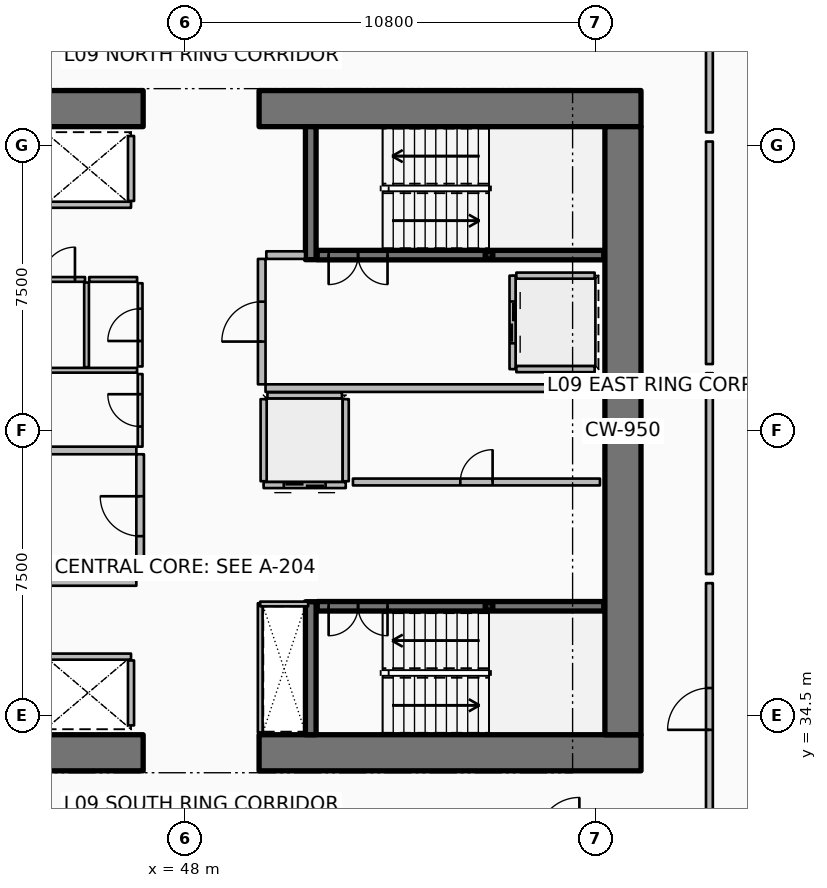
"""IFC4 building model, lengths in metres.
Left out: names, types, materials, properties, quantities, classifications, styles, units other than length and angle.
Written with IfcOpenShell. Run it as: python <this file> out.ifc"""

import sys

from ifc_helpers import new_model, si_unit, direction, frame, frame_2d, origin, origin_2d, place, context, subcontext, project, spatial, rectangle, hollow_rectangle, extrude, element, fill, save


model = new_model("IFC4")
c1 = context("Model", 3, precision=1e-05, world=origin(), true_north=direction((0.0, 1.0)))
c2 = subcontext(c1, "Body", "Model", "MODEL_VIEW")
j1 = project(units=[si_unit("LENGTHUNIT", "METRE"), si_unit("PLANEANGLEUNIT", "RADIAN")], contexts=[c1])
p1 = place(None, origin())
s1 = spatial("IfcSite", under=j1, at=p1, CompositionType="ELEMENT")
p2 = place(p1, origin())
s2 = spatial("IfcBuilding", under=s1, at=p2, CompositionType="ELEMENT")
p3 = place(p2, frame((0.0, 0.0, 41.4)))
s3 = spatial("IfcBuildingStorey", under=s2, at=p3, CompositionType="ELEMENT", Elevation=41.4)
p4 = place(p3, frame((36.85, 33.525, 0.0), z_axis=(0.0, 0.0, 1.0), x_axis=(1.0, 0.0, 0.0)))
e1 = element("IfcWall", 1, at=p4, inside=s3, PredefinedType="SHEAR", context=c2, shape_type="SweptSolid", body=[
    extrude(rectangle(XDim=10.05, YDim=0.95, at=frame_2d((5.025, 0.0))), origin(), (0.0, 0.0, 1.0), 3.75),
])
p5 = place(p3, frame((49.95, 33.525, 0.0), z_axis=(0.0, 0.0, 1.0), x_axis=(1.0, 0.0, 0.0)))
e2 = element("IfcWall", 2, at=p5, inside=s3, PredefinedType="SHEAR", context=c2, shape_type="SweptSolid", body=[
    extrude(rectangle(XDim=10.05, YDim=0.95, at=frame_2d((5.025, 0.0))), origin(), (0.0, 0.0, 1.0), 3.75),
])
p6 = place(p3, frame((36.85, 50.475, 0.0), z_axis=(0.0, 0.0, 1.0), x_axis=(1.0, 0.0, 0.0)))
e3 = element("IfcWall", 3, at=p6, inside=s3, PredefinedType="SHEAR", context=c2, shape_type="SweptSolid", body=[
    extrude(rectangle(XDim=10.05, YDim=0.95, at=frame_2d((5.025, 0.0))), origin(), (0.0, 0.0, 1.0), 3.75),
])
p7 = place(p3, frame((49.95, 50.475, 0.0), z_axis=(0.0, 0.0, 1.0), x_axis=(1.0, 0.0, 0.0)))
e4 = element("IfcWall", 4, at=p7, inside=s3, PredefinedType="SHEAR", context=c2, shape_type="SweptSolid", body=[
    extrude(rectangle(XDim=10.05, YDim=0.95, at=frame_2d((5.025, 0.0))), origin(), (0.0, 0.0, 1.0), 3.75),
])
p8 = place(p3, frame((59.525, 34.0, 0.0), z_axis=(0.0, 0.0, 1.0), x_axis=(0.0, 1.0, 0.0)))
e5 = element("IfcWall", 5, at=p8, inside=s3, PredefinedType="SHEAR", context=c2, shape_type="SweptSolid", body=[
    extrude(rectangle(XDim=16.0, YDim=0.95, at=frame_2d((8.0, 0.0))), origin(), (0.0, 0.0, 1.0), 3.75),
])
for number, where, z_axis, x_axis in (
    (6, (51.31, 46.5, 0.0), (0.0, 0.0, 1.0), (0.0, 1.0, 0.0)),
    (7, (51.31, 34.0, 0.0), (0.0, 0.0, 1.0), (0.0, 1.0, 0.0)),
):
    element("IfcWall", number, at=place(p3, frame(where, z_axis=z_axis, x_axis=x_axis)), inside=s3, PredefinedType="SHEAR", context=c2, shape_type="SweptSolid", body=[
        extrude(rectangle(XDim=3.5, YDim=0.28, at=frame_2d((1.75, 0.0))), origin(), (0.0, 0.0, 1.0), 3.75),
    ])
for number, where, z_axis, x_axis in (
    (8, (56.0, 46.62, 0.0), (0.0, 0.0, 1.0), (1.0, 0.0, 0.0)),
    (9, (56.0, 37.38, 0.0), (0.0, 0.0, 1.0), (1.0, 0.0, 0.0)),
):
    element("IfcColumn", number, at=place(p3, frame(where, z_axis=z_axis, x_axis=x_axis)), inside=s3, PredefinedType="COLUMN", context=c2, shape_type="SweptSolid", body=[
        extrude(hollow_rectangle(XDim=0.2, YDim=0.2, WallThickness=0.01, InnerFilletRadius=0.01, OuterFilletRadius=0.02, at=origin_2d()), origin(), (0.0, 0.0, 1.0), 1.67),
    ])
p9 = place(p3, frame((51.48, 46.62, 0.0), z_axis=(0.0, 0.0, 1.0), x_axis=(1.0, 0.0, 0.0)))
e10 = element("IfcWall", 10, at=p9, inside=s3, PredefinedType="SOLIDWALL", context=c2, shape_type="SweptSolid", body=[
    extrude(rectangle(XDim=7.54, YDim=0.25, at=frame_2d((3.77, 0.0))), origin(), (0.0, 0.0, 1.0), 3.5),
])
p10 = place(p9, frame((0.3, 0.0, 0.0)))
e11 = element("IfcOpeningElement", 11, at=p10, cuts=e10, PredefinedType="OPENING", context=c2, shape_type="SweptSolid", body=[
    extrude(rectangle(XDim=1.55, YDim=2.15, at=frame_2d((0.775, 1.075))), frame((0.0, 0.135, 0.0), z_axis=(0.0, -1.0, 0.0), x_axis=(1.0, 0.0, 0.0)), (0.0, 0.0, 1.0), 0.27),
])
p11 = place(p3, frame((51.48, 37.38, 0.0), z_axis=(0.0, 0.0, 1.0), x_axis=(1.0, 0.0, 0.0)))
e12 = element("IfcWall", 12, at=p11, inside=s3, PredefinedType="SOLIDWALL", context=c2, shape_type="SweptSolid", body=[
    extrude(rectangle(XDim=7.54, YDim=0.25, at=frame_2d((3.77, 0.0))), origin(), (0.0, 0.0, 1.0), 3.5),
])
p12 = place(p11, frame((0.3, 0.0, 0.0)))
e13 = element("IfcOpeningElement", 13, at=p12, cuts=e12, PredefinedType="OPENING", context=c2, shape_type="SweptSolid", body=[
    extrude(rectangle(XDim=1.55, YDim=2.15, at=frame_2d((0.775, 1.075))), frame((0.0, 0.135, 0.0), z_axis=(0.0, -1.0, 0.0), x_axis=(1.0, 0.0, 0.0)), (0.0, 0.0, 1.0), 0.27),
])
p13 = place(p3, frame((46.58, 47.945, 0.0), z_axis=(0.0, 0.0, 1.0), x_axis=(-1.0, 0.0, 0.0)))
e14 = element("IfcWall", 14, at=p13, inside=s3, PredefinedType="PARTITIONING", context=c2, shape_type="SweptSolid", body=[
    extrude(rectangle(XDim=2.26, YDim=0.16, at=frame_2d((1.13, 0.0))), origin(), (0.0, 0.0, 1.0), 3.5),
])
p14 = place(p3, frame((46.58, 48.045, 0.0), z_axis=(0.0, 0.0, 1.0), x_axis=(0.0, 1.0, 0.0)))
e15 = element("IfcWall", 15, at=p14, inside=s3, PredefinedType="PARTITIONING", context=c2, shape_type="SweptSolid", body=[
    extrude(rectangle(XDim=1.71, YDim=0.16, at=frame_2d((0.855, 0.0))), origin(), (0.0, 0.0, 1.0), 3.5),
])
p15 = place(p3, frame((44.32, 36.055, 0.0), z_axis=(0.0, 0.0, 1.0), x_axis=(1.0, 0.0, 0.0)))
e16 = element("IfcWall", 16, at=p15, inside=s3, PredefinedType="PARTITIONING", context=c2, shape_type="SweptSolid", body=[
    extrude(rectangle(XDim=2.26, YDim=0.16, at=frame_2d((1.13, 0.0))), origin(), (0.0, 0.0, 1.0), 3.5),
])
p16 = place(p3, frame((46.58, 34.245, 0.0), z_axis=(0.0, 0.0, 1.0), x_axis=(0.0, 1.0, 0.0)))
e17 = element("IfcWall", 17, at=p16, inside=s3, PredefinedType="PARTITIONING", context=c2, shape_type="SweptSolid", body=[
    extrude(rectangle(XDim=1.71, YDim=0.16, at=frame_2d((0.855, 0.0))), origin(), (0.0, 0.0, 1.0), 3.5),
])
p17 = place(p3, frame((56.62, 46.08, 0.0), z_axis=(0.0, 0.0, 1.0), x_axis=(0.0, -1.0, 0.0)))
e18 = element("IfcWall", 18, at=p17, inside=s3, PredefinedType="PARTITIONING", context=c2, shape_type="SweptSolid", body=[
    extrude(rectangle(XDim=2.46, YDim=0.16, at=frame_2d((1.23, 0.0))), origin(), (0.0, 0.0, 1.0), 3.5),
])
p18 = place(p17, frame((0.68, 0.0, 0.0)))
e19 = element("IfcOpeningElement", 19, at=p18, cuts=e18, PredefinedType="OPENING", context=c2, shape_type="SweptSolid", body=[
    extrude(rectangle(XDim=1.1, YDim=2.1, at=frame_2d((0.55, 1.05))), frame((0.0, 0.09, 0.0), z_axis=(0.0, -1.0, 0.0), x_axis=(1.0, 0.0, 0.0)), (0.0, 0.0, 1.0), 0.18),
])
for number, where, z_axis, x_axis in (
    (20, (56.72, 46.08, 0.0), (0.0, 0.0, 1.0), (1.0, 0.0, 0.0)),
    (21, (56.72, 43.62, 0.0), (0.0, 0.0, 1.0), (1.0, 0.0, 0.0)),
):
    element("IfcWall", number, at=place(p3, frame(where, z_axis=z_axis, x_axis=x_axis)), inside=s3, PredefinedType="PARTITIONING", context=c2, shape_type="SweptSolid", body=[
        extrude(rectangle(XDim=2.06, YDim=0.16, at=frame_2d((1.03, 0.0))), origin(), (0.0, 0.0, 1.0), 3.5),
    ])
p19 = place(p3, frame((52.23, 40.57, 0.0), z_axis=(0.0, 0.0, 1.0), x_axis=(-1.0, 0.0, 0.0)))
e22 = element("IfcWall", 22, at=p19, inside=s3, PredefinedType="PARTITIONING", context=c2, shape_type="SweptSolid", body=[
    extrude(rectangle(XDim=2.16, YDim=0.16, at=frame_2d((1.08, 0.0))), origin(), (0.0, 0.0, 1.0), 3.5),
])
p20 = place(p19, frame((0.53, 0.0, 0.0)))
e23 = element("IfcOpeningElement", 23, at=p20, cuts=e22, PredefinedType="OPENING", context=c2, shape_type="SweptSolid", body=[
    extrude(rectangle(XDim=1.1, YDim=2.1, at=frame_2d((0.55, 1.05))), frame((0.0, 0.09, 0.0), z_axis=(0.0, -1.0, 0.0), x_axis=(1.0, 0.0, 0.0)), (0.0, 0.0, 1.0), 0.18),
])
for number, where, z_axis, x_axis in (
    (24, (52.23, 40.67, 0.0), (0.0, 0.0, 1.0), (0.0, 1.0, 0.0)),
    (25, (50.07, 40.67, 0.0), (0.0, 0.0, 1.0), (0.0, 1.0, 0.0)),
):
    element("IfcWall", number, at=place(p3, frame(where, z_axis=z_axis, x_axis=x_axis)), inside=s3, PredefinedType="PARTITIONING", context=c2, shape_type="SweptSolid", body=[
        extrude(rectangle(XDim=2.16, YDim=0.16, at=frame_2d((1.08, 0.0))), origin(), (0.0, 0.0, 1.0), 3.5),
    ])
p21 = place(p3, frame((50.17, 42.93, 0.0), z_axis=(0.0, 0.0, 1.0), x_axis=(1.0, 0.0, 0.0)))
e26 = element("IfcWall", 26, at=p21, inside=s3, PredefinedType="PARTITIONING", context=c2, shape_type="SweptSolid", body=[
    extrude(rectangle(XDim=1.96, YDim=0.16, at=frame_2d((0.98, 0.0))), origin(), (0.0, 0.0, 1.0), 3.5),
])
p22 = place(p3, frame((52.42, 40.65, 0.0), z_axis=(0.0, 0.0, 1.0), x_axis=(1.0, 0.0, 0.0)))
e27 = element("IfcWall", 27, at=p22, inside=s3, PredefinedType="PARTITIONING", context=c2, shape_type="SweptSolid", body=[
    extrude(rectangle(XDim=6.5, YDim=0.18, at=frame_2d((3.25, 0.0))), origin(), (0.0, 0.0, 1.0), 3.5),
])
p23 = place(p22, frame((2.825, 0.0, 0.0)))
e28 = element("IfcOpeningElement", 28, at=p23, cuts=e27, PredefinedType="OPENING", context=c2, shape_type="SweptSolid", body=[
    extrude(rectangle(XDim=0.85, YDim=2.06, at=frame_2d((0.425, 1.03))), frame((0.0, 0.1, 0.0), z_axis=(0.0, -1.0, 0.0), x_axis=(1.0, 0.0, 0.0)), (0.0, 0.0, 1.0), 0.2),
])
p24 = place(p3, frame((41.35, 38.02, 0.0), z_axis=(0.0, 0.0, 1.0), x_axis=(1.0, 0.0, 0.0)))
e29 = element("IfcWall", 29, at=p24, inside=s3, PredefinedType="PARTITIONING", context=c2, shape_type="SweptSolid", body=[
    extrude(rectangle(XDim=5.37, YDim=0.2, at=frame_2d((2.685, 0.0))), origin(), (0.0, 0.0, 1.0), 3.5),
])
p25 = place(p3, frame((43.92, 41.48, 0.0), z_axis=(0.0, 0.0, 1.0), x_axis=(1.0, 0.0, 0.0)))
e30 = element("IfcWall", 30, at=p25, inside=s3, PredefinedType="PARTITIONING", context=c2, shape_type="SweptSolid", body=[
    extrude(rectangle(XDim=2.8, YDim=0.2, at=frame_2d((1.4, 0.0))), origin(), (0.0, 0.0, 1.0), 3.5),
])
p26 = place(p3, frame((46.82, 38.12, 0.0), z_axis=(0.0, 0.0, 1.0), x_axis=(0.0, 1.0, 0.0)))
e31 = element("IfcWall", 31, at=p26, inside=s3, PredefinedType="PARTITIONING", context=c2, shape_type="SweptSolid", body=[
    extrude(rectangle(XDim=3.26, YDim=0.2, at=frame_2d((1.63, 0.0))), origin(), (0.0, 0.0, 1.0), 3.5),
])
p27 = place(p26, frame((1.105, 0.0, 0.0)))
e32 = element("IfcOpeningElement", 32, at=p27, cuts=e31, PredefinedType="OPENING", context=c2, shape_type="SweptSolid", body=[
    extrude(rectangle(XDim=1.05, YDim=2.1, at=frame_2d((0.525, 1.05))), frame((0.0, 0.11, 0.0), z_axis=(0.0, -1.0, 0.0), x_axis=(1.0, 0.0, 0.0)), (0.0, 0.0, 1.0), 0.22),
])
p28 = place(p3, frame((50.12, 43.12, 0.0), z_axis=(0.0, 0.0, 1.0), x_axis=(1.0, 0.0, 0.0)))
e33 = element("IfcWall", 33, at=p28, inside=s3, PredefinedType="PARTITIONING", context=c2, shape_type="SweptSolid", body=[
    extrude(rectangle(XDim=8.88, YDim=0.2, at=frame_2d((4.44, 0.0))), origin(), (0.0, 0.0, 1.0), 3.5),
])
p29 = place(p3, frame((50.14, 46.62, 0.0), z_axis=(0.0, 0.0, 1.0), x_axis=(1.0, 0.0, 0.0)))
e34 = element("IfcWall", 34, at=p29, inside=s3, PredefinedType="PARTITIONING", context=c2, shape_type="SweptSolid", body=[
    extrude(rectangle(XDim=1.02, YDim=0.2, at=frame_2d((0.51, 0.0))), origin(), (0.0, 0.0, 1.0), 3.5),
])
p30 = place(p3, frame((50.02, 43.22, 0.0), z_axis=(0.0, 0.0, 1.0), x_axis=(0.0, 1.0, 0.0)))
e35 = element("IfcWall", 35, at=p30, inside=s3, PredefinedType="PARTITIONING", context=c2, shape_type="SweptSolid", body=[
    extrude(rectangle(XDim=3.3, YDim=0.2, at=frame_2d((1.65, 0.0))), origin(), (0.0, 0.0, 1.0), 3.5),
])
p31 = place(p30, frame((1.125, 0.0, 0.0)))
e36 = element("IfcOpeningElement", 36, at=p31, cuts=e35, PredefinedType="OPENING", context=c2, shape_type="SweptSolid", body=[
    extrude(rectangle(XDim=1.05, YDim=2.1, at=frame_2d((0.525, 1.05))), frame((0.0, 0.11, 0.0), z_axis=(0.0, -1.0, 0.0), x_axis=(1.0, 0.0, 0.0)), (0.0, 0.0, 1.0), 0.22),
])
p32 = place(p3, frame((49.98, 34.06, 0.0), z_axis=(0.0, 0.0, 1.0), x_axis=(0.0, 1.0, 0.0)))
e37 = element("IfcWall", 37, at=p32, inside=s3, PredefinedType="PARTITIONING", context=c2, shape_type="SweptSolid", body=[
    extrude(rectangle(XDim=3.4, YDim=0.125, at=frame_2d((1.7, 0.0))), origin(), (0.0, 0.0, 1.0), 2.94),
])
p33 = place(p3, frame((49.98, 37.44, 0.0), z_axis=(0.0, 0.0, 1.0), x_axis=(1.0, 0.0, 0.0)))
e38 = element("IfcWall", 38, at=p33, inside=s3, PredefinedType="PARTITIONING", context=c2, shape_type="SweptSolid", body=[
    extrude(rectangle(XDim=1.26, YDim=0.125, at=frame_2d((0.63, 0.0))), origin(), (0.0, 0.0, 1.0), 2.94),
])
p34 = place(p3, frame((44.03, 43.59, 0.0), z_axis=(0.0, 0.0, 1.0), x_axis=(1.0, 0.0, 0.0)))
e39 = element("IfcWall", 39, at=p34, inside=s3, PredefinedType="PARTITIONING", context=c2, shape_type="SweptSolid", body=[
    extrude(rectangle(XDim=2.71, YDim=0.125, at=frame_2d((1.355, 0.0))), origin(), (0.0, 0.0, 1.0), 2.94),
])
p35 = place(p3, frame((45.41, 43.67, 0.0), z_axis=(0.0, 0.0, 1.0), x_axis=(0.0, 1.0, 0.0)))
e40 = element("IfcWall", 40, at=p35, inside=s3, PredefinedType="PARTITIONING", context=c2, shape_type="SweptSolid", body=[
    extrude(rectangle(XDim=2.23, YDim=0.125, at=frame_2d((1.115, 0.0))), origin(), (0.0, 0.0, 1.0), 2.94),
])
p36 = place(p3, frame((46.82, 41.58, 0.0), z_axis=(0.0, 0.0, 1.0), x_axis=(0.0, 1.0, 0.0)))
e41 = element("IfcWall", 41, at=p36, inside=s3, PredefinedType="PARTITIONING", context=c2, shape_type="SweptSolid", body=[
    extrude(rectangle(XDim=1.91, YDim=0.125, at=frame_2d((0.955, 0.0))), origin(), (0.0, 0.0, 1.0), 2.94),
])
p37 = place(p36, frame((0.53, 0.0, 0.0)))
e42 = element("IfcOpeningElement", 42, at=p37, cuts=e41, PredefinedType="OPENING", context=c2, shape_type="SweptSolid", body=[
    extrude(rectangle(XDim=0.85, YDim=2.06, at=frame_2d((0.425, 1.03))), frame((0.0, 0.073, 0.0), z_axis=(0.0, -1.0, 0.0), x_axis=(1.0, 0.0, 0.0)), (0.0, 0.0, 1.0), 0.145),
])
p38 = place(p3, frame((46.82, 43.69, 0.0), z_axis=(0.0, 0.0, 1.0), x_axis=(0.0, 1.0, 0.0)))
e43 = element("IfcWall", 43, at=p38, inside=s3, PredefinedType="PARTITIONING", context=c2, shape_type="SweptSolid", body=[
    extrude(rectangle(XDim=2.19, YDim=0.125, at=frame_2d((1.095, 0.0))), origin(), (0.0, 0.0, 1.0), 2.94),
])
p39 = place(p38, frame((0.67, 0.0, 0.0)))
e44 = element("IfcOpeningElement", 44, at=p39, cuts=e43, PredefinedType="OPENING", context=c2, shape_type="SweptSolid", body=[
    extrude(rectangle(XDim=0.85, YDim=2.06, at=frame_2d((0.425, 1.03))), frame((0.0, 0.073, 0.0), z_axis=(0.0, -1.0, 0.0), x_axis=(1.0, 0.0, 0.0)), (0.0, 0.0, 1.0), 0.145),
])
p40 = place(p3, frame((43.99, 45.98, 0.0), z_axis=(0.0, 0.0, 1.0), x_axis=(1.0, 0.0, 0.0)))
e45 = element("IfcWall", 45, at=p40, inside=s3, PredefinedType="PARTITIONING", context=c2, shape_type="SweptSolid", body=[
    extrude(rectangle(XDim=1.38, YDim=0.125, at=frame_2d((0.69, 0.0))), origin(), (0.0, 0.0, 1.0), 2.94),
])
p41 = place(p40, frame((0.265, 0.0, 0.0)))
e46 = element("IfcOpeningElement", 46, at=p41, cuts=e45, PredefinedType="OPENING", context=c2, shape_type="SweptSolid", body=[
    extrude(rectangle(XDim=0.85, YDim=2.06, at=frame_2d((0.425, 1.03))), frame((0.0, 0.073, 0.0), z_axis=(0.0, -1.0, 0.0), x_axis=(1.0, 0.0, 0.0)), (0.0, 0.0, 1.0), 0.145),
])
p42 = place(p3, frame((45.48, 45.98, 0.0), z_axis=(0.0, 0.0, 1.0), x_axis=(1.0, 0.0, 0.0)))
e47 = element("IfcWall", 47, at=p42, inside=s3, PredefinedType="PARTITIONING", context=c2, shape_type="SweptSolid", body=[
    extrude(rectangle(XDim=1.26, YDim=0.125, at=frame_2d((0.63, 0.0))), origin(), (0.0, 0.0, 1.0), 2.94),
])
p43 = place(p3, frame((61.8, 31.37, 0.0), z_axis=(0.0, 0.0, 1.0), x_axis=(0.0, 1.0, 0.0)))
e48 = element("IfcWall", 48, at=p43, inside=s3, PredefinedType="PARTITIONING", context=c2, shape_type="SweptSolid", body=[
    extrude(rectangle(XDim=6.618, YDim=0.18, at=frame_2d((3.309, 0.0))), origin(), (0.0, 0.0, 1.0), 2.867),
])
p44 = place(p43, frame((2.759, 0.0, 0.0)))
e49 = element("IfcOpeningElement", 49, at=p44, cuts=e48, PredefinedType="OPENING", context=c2, shape_type="SweptSolid", body=[
    extrude(rectangle(XDim=1.1, YDim=2.1, at=frame_2d((0.55, 1.05))), frame((0.0, 0.1, 0.0), z_axis=(0.0, -1.0, 0.0), x_axis=(1.0, 0.0, 0.0)), (0.0, 0.0, 1.0), 0.2),
])
p45 = place(p3, frame((61.8, 38.228, 0.0), z_axis=(0.0, 0.0, 1.0), x_axis=(0.0, 1.0, 0.0)))
e50 = element("IfcWall", 50, at=p45, inside=s3, PredefinedType="PARTITIONING", context=c2, shape_type="SweptSolid", body=[
    extrude(rectangle(XDim=5.285, YDim=0.18, at=frame_2d((2.643, 0.0))), origin(), (0.0, 0.0, 1.0), 2.867),
])
p46 = place(p3, frame((61.8, 43.753, 0.0), z_axis=(0.0, 0.0, 1.0), x_axis=(0.0, 1.0, 0.0)))
e51 = element("IfcWall", 51, at=p46, inside=s3, PredefinedType="PARTITIONING", context=c2, shape_type="SweptSolid", body=[
    extrude(rectangle(XDim=5.855, YDim=0.18, at=frame_2d((2.927, 0.0))), origin(), (0.0, 0.0, 1.0), 2.867),
])
p47 = place(p3, frame((61.8, 49.848, 0.0), z_axis=(0.0, 0.0, 1.0), x_axis=(0.0, 1.0, 0.0)))
e52 = element("IfcWall", 52, at=p47, inside=s3, PredefinedType="PARTITIONING", context=c2, shape_type="SweptSolid", body=[
    extrude(rectangle(XDim=2.781, YDim=0.18, at=frame_2d((1.391, 0.0))), origin(), (0.0, 0.0, 1.0), 2.867),
])
p48 = place(p10, origin())
e53 = element("IfcDoor", 53, at=p48, inside=s3, OperationType="DOUBLE_DOOR_SINGLE_SWING", PredefinedType="DOOR", context=c2, shape_type="SweptSolid", body=[
    extrude(rectangle(XDim=1.55, YDim=2.15, at=frame_2d((0.775, 1.075))), frame((0.0, 0.025, 0.0), z_axis=(0.0, -1.0, 0.0), x_axis=(1.0, 0.0, 0.0)), (0.0, 0.0, 1.0), 0.05),
])
fill(e11, e53)
p49 = place(p12, origin())
e54 = element("IfcDoor", 54, at=p49, inside=s3, OperationType="DOUBLE_DOOR_SINGLE_SWING", PredefinedType="DOOR", context=c2, shape_type="SweptSolid", body=[
    extrude(rectangle(XDim=1.55, YDim=2.15, at=frame_2d((0.775, 1.075))), frame((0.0, 0.025, 0.0), z_axis=(0.0, -1.0, 0.0), x_axis=(1.0, 0.0, 0.0)), (0.0, 0.0, 1.0), 0.05),
])
fill(e13, e54)
p50 = place(p18, origin())
e55 = element("IfcDoor", 55, at=p50, inside=s3, OperationType="DOUBLE_DOOR_SLIDING", PredefinedType="DOOR", context=c2, shape_type="SweptSolid", body=[
    extrude(rectangle(XDim=1.1, YDim=2.1, at=frame_2d((0.55, 1.05))), frame((0.0, 0.025, 0.0), z_axis=(0.0, -1.0, 0.0), x_axis=(1.0, 0.0, 0.0)), (0.0, 0.0, 1.0), 0.05),
])
fill(e19, e55)
p51 = place(p20, origin())
e56 = element("IfcDoor", 56, at=p51, inside=s3, OperationType="DOUBLE_DOOR_SLIDING", PredefinedType="DOOR", context=c2, shape_type="SweptSolid", body=[
    extrude(rectangle(XDim=1.1, YDim=2.1, at=frame_2d((0.55, 1.05))), frame((0.0, 0.025, 0.0), z_axis=(0.0, -1.0, 0.0), x_axis=(1.0, 0.0, 0.0)), (0.0, 0.0, 1.0), 0.05),
])
fill(e23, e56)
p52 = place(p23, origin())
e57 = element("IfcDoor", 57, at=p52, inside=s3, OperationType="SINGLE_SWING_RIGHT", PredefinedType="DOOR", context=c2, shape_type="SweptSolid", body=[
    extrude(rectangle(XDim=0.85, YDim=2.06, at=frame_2d((0.425, 1.03))), frame((0.0, 0.025, 0.0), z_axis=(0.0, -1.0, 0.0), x_axis=(1.0, 0.0, 0.0)), (0.0, 0.0, 1.0), 0.05),
])
fill(e28, e57)
p53 = place(p27, origin())
e58 = element("IfcDoor", 58, at=p53, inside=s3, OperationType="SINGLE_SWING_RIGHT", PredefinedType="DOOR", context=c2, shape_type="SweptSolid", body=[
    extrude(rectangle(XDim=1.05, YDim=2.1, at=frame_2d((0.525, 1.05))), frame((0.0, 0.025, 0.0), z_axis=(0.0, -1.0, 0.0), x_axis=(1.0, 0.0, 0.0)), (0.0, 0.0, 1.0), 0.05),
])
fill(e32, e58)
p54 = place(p31, origin())
e59 = element("IfcDoor", 59, at=p54, inside=s3, OperationType="SINGLE_SWING_LEFT", PredefinedType="DOOR", context=c2, shape_type="SweptSolid", body=[
    extrude(rectangle(XDim=1.05, YDim=2.1, at=frame_2d((0.525, 1.05))), frame((0.0, 0.025, 0.0), z_axis=(0.0, -1.0, 0.0), x_axis=(1.0, 0.0, 0.0)), (0.0, 0.0, 1.0), 0.05),
])
fill(e36, e59)
p55 = place(p37, origin())
e60 = element("IfcDoor", 60, at=p55, inside=s3, OperationType="SINGLE_SWING_RIGHT", PredefinedType="DOOR", context=c2, shape_type="SweptSolid", body=[
    extrude(rectangle(XDim=0.85, YDim=2.06, at=frame_2d((0.425, 1.03))), frame((0.0, 0.025, 0.0), z_axis=(0.0, -1.0, 0.0), x_axis=(1.0, 0.0, 0.0)), (0.0, 0.0, 1.0), 0.05),
])
fill(e42, e60)
p56 = place(p39, origin())
e61 = element("IfcDoor", 61, at=p56, inside=s3, OperationType="SINGLE_SWING_LEFT", PredefinedType="DOOR", context=c2, shape_type="SweptSolid", body=[
    extrude(rectangle(XDim=0.85, YDim=2.06, at=frame_2d((0.425, 1.03))), frame((0.0, 0.025, 0.0), z_axis=(0.0, -1.0, 0.0), x_axis=(1.0, 0.0, 0.0)), (0.0, 0.0, 1.0), 0.05),
])
fill(e44, e61)
p57 = place(p41, origin())
e62 = element("IfcDoor", 62, at=p57, inside=s3, OperationType="SINGLE_SWING_RIGHT", PredefinedType="DOOR", context=c2, shape_type="SweptSolid", body=[
    extrude(rectangle(XDim=0.85, YDim=2.06, at=frame_2d((0.425, 1.03))), frame((0.0, 0.025, 0.0), z_axis=(0.0, -1.0, 0.0), x_axis=(1.0, 0.0, 0.0)), (0.0, 0.0, 1.0), 0.05),
])
fill(e46, e62)
p58 = place(p44, origin())
e63 = element("IfcDoor", 63, at=p58, inside=s3, OperationType="SINGLE_SWING_LEFT", PredefinedType="DOOR", context=c2, shape_type="SweptSolid", body=[
    extrude(rectangle(XDim=1.1, YDim=2.1, at=frame_2d((0.55, 1.05))), frame((0.0, 0.025, 0.0), z_axis=(0.0, -1.0, 0.0), x_axis=(1.0, 0.0, 0.0)), (0.0, 0.0, 1.0), 0.05),
])
fill(e49, e63)
save(model, sys.argv[1])
